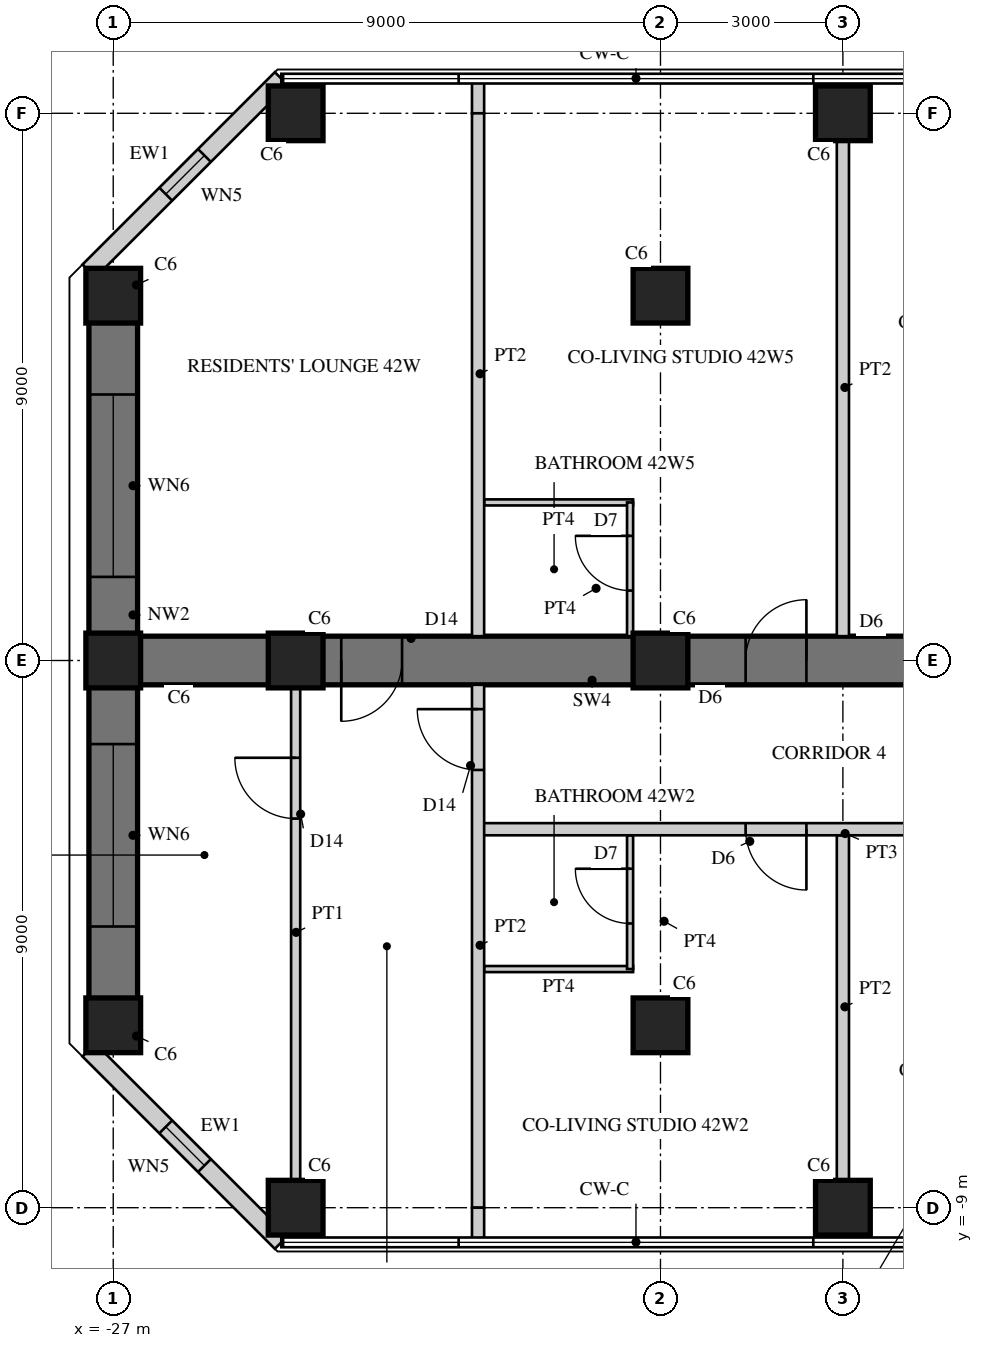
"""IFC4 building model, lengths in metres.
Left out: names, types, materials, properties, quantities, classifications, styles, units other than length and angle.
Written with IfcOpenShell. Run it as: python <this file> out.ifc"""

import sys

from ifc_helpers import new_model, si_unit, direction, frame, frame_2d, origin, origin_2d, place, context, subcontext, project, spatial, rectangle, hollow_rectangle, extrude, element, fill, save


model = new_model("IFC4")
c1 = context("Model", 3, precision=1e-05, world=origin(), true_north=direction((0.0, 1.0)))
c2 = subcontext(c1, "Body", "Model", "MODEL_VIEW")
j1 = project(units=[si_unit("LENGTHUNIT", "METRE"), si_unit("PLANEANGLEUNIT", "RADIAN")], contexts=[c1])
p1 = place(None, origin())
s1 = spatial("IfcSite", under=j1, at=p1, CompositionType="ELEMENT")
p2 = place(p1, origin())
s2 = spatial("IfcBuilding", under=s1, at=p2, CompositionType="ELEMENT")
p3 = place(p2, frame((0.0, 0.0, 172.9)))
s3 = spatial("IfcBuildingStorey", under=s2, at=p3, CompositionType="ELEMENT", Elevation=172.9)
p4 = place(p3, frame((-9.0, 0.0, 0.0), z_axis=(0.0, 0.0, 1.0), x_axis=(-1.0, 0.0, 0.0)))
e1 = element("IfcWall", 1, at=p4, inside=s3, PredefinedType="SHEAR", context=c2, shape_type="SweptSolid", body=[
    extrude(rectangle(XDim=18.0, YDim=0.8, at=frame_2d((9.0, 0.0))), origin(), (0.0, 0.0, 1.0), 3.4),
])
p5 = place(p4, frame((3.95, 0.0, 0.0)))
e2 = element("IfcOpeningElement", 2, at=p5, cuts=e1, PredefinedType="OPENING", context=c2, shape_type="SweptSolid", body=[
    extrude(rectangle(XDim=1.0, YDim=2.15, at=frame_2d((0.5, 1.075))), frame((0.0, 0.41, 0.0), z_axis=(0.0, -1.0, 0.0), x_axis=(1.0, 0.0, 0.0)), (0.0, 0.0, 1.0), 0.82),
])
p6 = place(p4, frame((6.6, 0.0, 0.0)))
e3 = element("IfcOpeningElement", 3, at=p6, cuts=e1, PredefinedType="OPENING", context=c2, shape_type="SweptSolid", body=[
    extrude(rectangle(XDim=1.0, YDim=2.15, at=frame_2d((0.5, 1.075))), frame((0.0, 0.41, 0.0), z_axis=(0.0, -1.0, 0.0), x_axis=(1.0, 0.0, 0.0)), (0.0, 0.0, 1.0), 0.82),
])
p7 = place(p4, frame((13.25, 0.0, 0.0)))
e4 = element("IfcOpeningElement", 4, at=p7, cuts=e1, PredefinedType="OPENING", context=c2, shape_type="SweptSolid", body=[
    extrude(rectangle(XDim=1.0, YDim=2.2, at=frame_2d((0.5, 1.1))), frame((0.0, 0.41, 0.0), z_axis=(0.0, -1.0, 0.0), x_axis=(1.0, 0.0, 0.0)), (0.0, 0.0, 1.0), 0.82),
])
p8 = place(p3, frame((-27.0, 6.0, 0.0), z_axis=(0.0, 0.0, 1.0), x_axis=(0.0, -1.0, 0.0)))
e5 = element("IfcWall", 5, at=p8, inside=s3, PredefinedType="SHEAR", context=c2, shape_type="SweptSolid", body=[
    extrude(rectangle(XDim=12.0, YDim=0.8, at=frame_2d((6.0, 0.0))), origin(), (0.0, 0.0, 1.0), 3.4),
])
p9 = place(p8, frame((1.625, 0.0, 0.6)))
e6 = element("IfcOpeningElement", 6, at=p9, cuts=e5, PredefinedType="OPENING", context=c2, shape_type="SweptSolid", body=[
    extrude(rectangle(XDim=3.0, YDim=2.4, at=frame_2d((1.5, 1.2))), frame((0.0, 0.41, 0.0), z_axis=(0.0, -1.0, 0.0), x_axis=(1.0, 0.0, 0.0)), (0.0, 0.0, 1.0), 0.82),
])
p10 = place(p8, frame((7.375, 0.0, 0.6)))
e7 = element("IfcOpeningElement", 7, at=p10, cuts=e5, PredefinedType="OPENING", context=c2, shape_type="SweptSolid", body=[
    extrude(rectangle(XDim=3.0, YDim=2.4, at=frame_2d((1.5, 1.2))), frame((0.0, 0.41, 0.0), z_axis=(0.0, -1.0, 0.0), x_axis=(1.0, 0.0, 0.0)), (0.0, 0.0, 1.0), 0.82),
])
for number, where, z_axis, x_axis in (
    (8, (-15.0, 9.0, 0.0), (0.0, 0.0, 1.0), (1.0, 0.0, 0.0)),
    (9, (-24.0, 9.0, 0.0), (0.0, 0.0, 1.0), (1.0, 0.0, 0.0)),
    (10, (-15.0, -9.0, 0.0), (0.0, 0.0, 1.0), (1.0, 0.0, 0.0)),
    (11, (-24.0, -9.0, 0.0), (0.0, 0.0, 1.0), (1.0, 0.0, 0.0)),
    (12, (-27.0, 6.0, 0.0), (0.0, 0.0, 1.0), (1.0, 0.0, 0.0)),
    (13, (-27.0, 0.0, 0.0), (0.0, 0.0, 1.0), (1.0, 0.0, 0.0)),
    (14, (-27.0, -6.0, 0.0), (0.0, 0.0, 1.0), (1.0, 0.0, 0.0)),
    (15, (-18.0, 6.0, 0.0), (0.0, 0.0, 1.0), (1.0, 0.0, 0.0)),
    (16, (-18.0, 0.0, 0.0), (0.0, 0.0, 1.0), (1.0, 0.0, 0.0)),
    (17, (-18.0, -6.0, 0.0), (0.0, 0.0, 1.0), (1.0, 0.0, 0.0)),
    (18, (-24.0, 0.0, 0.0), (0.0, 0.0, 1.0), (1.0, 0.0, 0.0)),
):
    element("IfcColumn", number, at=place(p3, frame(where, z_axis=z_axis, x_axis=x_axis)), inside=s3, PredefinedType="COLUMN", context=c2, shape_type="SweptSolid", body=[
        extrude(rectangle(XDim=0.9, YDim=0.9, at=origin_2d()), origin(), (0.0, 0.0, 1.0), 3.4),
    ])
p11 = place(p3, frame((-24.236, 9.57, 0.0), z_axis=(0.0, 0.0, 1.0), x_axis=(-0.707079499254, -0.707134062067, 0.0)))
e19 = element("IfcWall", 19, at=p11, inside=s3, PredefinedType="SOLIDWALL", context=c2, shape_type="SweptSolid", body=[
    extrude(rectangle(XDim=4.475, YDim=0.3, at=frame_2d((2.237, 0.0))), origin(), (0.0, 0.0, 1.0), 3.22),
])
p12 = place(p11, frame((1.787, 0.0, 0.3)))
e20 = element("IfcOpeningElement", 20, at=p12, cuts=e19, PredefinedType="OPENING", context=c2, shape_type="SweptSolid", body=[
    extrude(rectangle(XDim=0.9, YDim=2.4, at=frame_2d((0.45, 1.2))), frame((0.0, 0.16, 0.0), z_axis=(0.0, -1.0, 0.0), x_axis=(1.0, 0.0, 0.0)), (0.0, 0.0, 1.0), 0.32),
])
p13 = place(p3, frame((-27.4, -6.406, 0.0), z_axis=(0.0, 0.0, 1.0), x_axis=(0.707079499254, -0.707134062067, 0.0)))
e21 = element("IfcWall", 21, at=p13, inside=s3, PredefinedType="SOLIDWALL", context=c2, shape_type="SweptSolid", body=[
    extrude(rectangle(XDim=4.475, YDim=0.3, at=frame_2d((2.237, 0.0))), origin(), (0.0, 0.0, 1.0), 3.22),
])
p14 = place(p13, frame((1.787, 0.0, 0.3)))
e22 = element("IfcOpeningElement", 22, at=p14, cuts=e21, PredefinedType="OPENING", context=c2, shape_type="SweptSolid", body=[
    extrude(rectangle(XDim=0.9, YDim=2.4, at=frame_2d((0.45, 1.2))), frame((0.0, 0.16, 0.0), z_axis=(0.0, -1.0, 0.0), x_axis=(1.0, 0.0, 0.0)), (0.0, 0.0, 1.0), 0.32),
])
p15 = place(p3, frame((-15.0, -2.875, 0.0), z_axis=(0.0, 0.0, 1.0), x_axis=(0.0, -1.0, 0.0)))
e23 = element("IfcWall", 23, at=p15, inside=s3, PredefinedType="SOLIDWALL", context=c2, shape_type="SweptSolid", body=[
    extrude(rectangle(XDim=5.675, YDim=0.2, at=frame_2d((2.837, 0.0))), origin(), (0.0, 0.0, 1.0), 2.47),
])
p16 = place(p3, frame((-15.0, 8.55, 0.0), z_axis=(0.0, 0.0, 1.0), x_axis=(0.0, -1.0, 0.0)))
e24 = element("IfcWall", 24, at=p16, inside=s3, PredefinedType="SOLIDWALL", context=c2, shape_type="SweptSolid", body=[
    extrude(rectangle(XDim=8.15, YDim=0.2, at=frame_2d((4.075, 0.0))), origin(), (0.0, 0.0, 1.0), 2.47),
])
p17 = place(p3, frame((-18.45, -5.075, 0.0), z_axis=(0.0, 0.0, 1.0), x_axis=(-1.0, 0.0, 0.0)))
e25 = element("IfcWall", 25, at=p17, inside=s3, PredefinedType="PARTITIONING", context=c2, shape_type="SweptSolid", body=[
    extrude(rectangle(XDim=2.45, YDim=0.1, at=frame_2d((1.225, 0.0))), origin(), (0.0, 0.0, 1.0), 3.22),
])
p18 = place(p3, frame((-18.5, -2.875, 0.0), z_axis=(0.0, 0.0, 1.0), x_axis=(0.0, -1.0, 0.0)))
e26 = element("IfcWall", 26, at=p18, inside=s3, PredefinedType="PARTITIONING", context=c2, shape_type="SweptSolid", body=[
    extrude(rectangle(XDim=2.2, YDim=0.1, at=frame_2d((1.1, 0.0))), origin(), (0.0, 0.0, 1.0), 3.22),
])
p19 = place(p18, frame((0.55, 0.0, 0.0)))
e27 = element("IfcOpeningElement", 27, at=p19, cuts=e26, PredefinedType="OPENING", context=c2, shape_type="SweptSolid", body=[
    extrude(rectangle(XDim=0.9, YDim=2.1, at=frame_2d((0.45, 1.05))), frame((0.0, 0.06, 0.0), z_axis=(0.0, -1.0, 0.0), x_axis=(1.0, 0.0, 0.0)), (0.0, 0.0, 1.0), 0.12),
])
p20 = place(p3, frame((-18.45, 2.6, 0.0), z_axis=(0.0, 0.0, 1.0), x_axis=(-1.0, 0.0, 0.0)))
e28 = element("IfcWall", 28, at=p20, inside=s3, PredefinedType="PARTITIONING", context=c2, shape_type="SweptSolid", body=[
    extrude(rectangle(XDim=2.45, YDim=0.1, at=frame_2d((1.225, 0.0))), origin(), (0.0, 0.0, 1.0), 3.22),
])
p21 = place(p3, frame((-18.5, 2.6, 0.0), z_axis=(0.0, 0.0, 1.0), x_axis=(0.0, -1.0, 0.0)))
e29 = element("IfcWall", 29, at=p21, inside=s3, PredefinedType="PARTITIONING", context=c2, shape_type="SweptSolid", body=[
    extrude(rectangle(XDim=2.2, YDim=0.1, at=frame_2d((1.1, 0.0))), origin(), (0.0, 0.0, 1.0), 3.22),
])
p22 = place(p21, frame((0.55, 0.0, 0.0)))
e30 = element("IfcOpeningElement", 30, at=p22, cuts=e29, PredefinedType="OPENING", context=c2, shape_type="SweptSolid", body=[
    extrude(rectangle(XDim=0.9, YDim=2.1, at=frame_2d((0.45, 1.05))), frame((0.0, 0.06, 0.0), z_axis=(0.0, -1.0, 0.0), x_axis=(1.0, 0.0, 0.0)), (0.0, 0.0, 1.0), 0.12),
])
p23 = place(p3, frame((-9.55, -2.775, 0.0), z_axis=(0.0, 0.0, 1.0), x_axis=(-1.0, 0.0, 0.0)))
e31 = element("IfcWall", 31, at=p23, inside=s3, PredefinedType="SOLIDWALL", context=c2, shape_type="SweptSolid", body=[
    extrude(rectangle(XDim=11.45, YDim=0.2, at=frame_2d((5.725, 0.0))), origin(), (0.0, 0.0, 1.0), 3.22),
])
p24 = place(p23, frame((3.4, 0.0, 0.0)))
e32 = element("IfcOpeningElement", 32, at=p24, cuts=e31, PredefinedType="OPENING", context=c2, shape_type="SweptSolid", body=[
    extrude(rectangle(XDim=1.0, YDim=2.15, at=frame_2d((0.5, 1.075))), frame((0.0, 0.11, 0.0), z_axis=(0.0, -1.0, 0.0), x_axis=(1.0, 0.0, 0.0)), (0.0, 0.0, 1.0), 0.22),
])
p25 = place(p23, frame((6.05, 0.0, 0.0)))
e33 = element("IfcOpeningElement", 33, at=p25, cuts=e31, PredefinedType="OPENING", context=c2, shape_type="SweptSolid", body=[
    extrude(rectangle(XDim=1.0, YDim=2.15, at=frame_2d((0.5, 1.075))), frame((0.0, 0.11, 0.0), z_axis=(0.0, -1.0, 0.0), x_axis=(1.0, 0.0, 0.0)), (0.0, 0.0, 1.0), 0.22),
])
p26 = place(p3, frame((-24.0, -0.4, 0.0), z_axis=(0.0, 0.0, 1.0), x_axis=(0.0, -1.0, 0.0)))
e34 = element("IfcWall", 34, at=p26, inside=s3, PredefinedType="PARTITIONING", context=c2, shape_type="SweptSolid", body=[
    extrude(rectangle(XDim=8.15, YDim=0.15, at=frame_2d((4.075, 0.0))), origin(), (0.0, 0.0, 1.0), 2.47),
])
p27 = place(p26, frame((1.2, 0.0, 0.0)))
e35 = element("IfcOpeningElement", 35, at=p27, cuts=e34, PredefinedType="OPENING", context=c2, shape_type="SweptSolid", body=[
    extrude(rectangle(XDim=1.0, YDim=2.2, at=frame_2d((0.5, 1.1))), frame((0.0, 0.085, 0.0), z_axis=(0.0, -1.0, 0.0), x_axis=(1.0, 0.0, 0.0)), (0.0, 0.0, 1.0), 0.17),
])
p28 = place(p3, frame((-21.0, 9.53, 0.0), z_axis=(0.0, 0.0, 1.0), x_axis=(0.0, -1.0, 0.0)))
e36 = element("IfcWall", 36, at=p28, inside=s3, PredefinedType="SOLIDWALL", context=c2, shape_type="SweptSolid", body=[
    extrude(rectangle(XDim=0.53, YDim=0.2, at=frame_2d((0.265, 0.0))), origin(), (0.0, 0.0, 1.0), 3.22),
])
p29 = place(p3, frame((-21.0, 9.0, 0.0), z_axis=(0.0, 0.0, 1.0), x_axis=(0.0, -1.0, 0.0)))
e37 = element("IfcWall", 37, at=p29, inside=s3, PredefinedType="SOLIDWALL", context=c2, shape_type="SweptSolid", body=[
    extrude(rectangle(XDim=8.6, YDim=0.2, at=frame_2d((4.3, 0.0))), origin(), (0.0, 0.0, 1.0), 2.62),
])
p30 = place(p3, frame((-21.0, -0.4, 0.0), z_axis=(0.0, 0.0, 1.0), x_axis=(0.0, -1.0, 0.0)))
e38 = element("IfcWall", 38, at=p30, inside=s3, PredefinedType="SOLIDWALL", context=c2, shape_type="SweptSolid", body=[
    extrude(rectangle(XDim=8.6, YDim=0.2, at=frame_2d((4.3, 0.0))), origin(), (0.0, 0.0, 1.0), 2.62),
])
p31 = place(p30, frame((0.4, 0.0, 0.0)))
e39 = element("IfcOpeningElement", 39, at=p31, cuts=e38, PredefinedType="OPENING", context=c2, shape_type="SweptSolid", body=[
    extrude(rectangle(XDim=1.0, YDim=2.2, at=frame_2d((0.5, 1.1))), frame((0.0, 0.11, 0.0), z_axis=(0.0, -1.0, 0.0), x_axis=(1.0, 0.0, 0.0)), (0.0, 0.0, 1.0), 0.22),
])
p32 = place(p3, frame((-21.0, -9.0, 0.0), z_axis=(0.0, 0.0, 1.0), x_axis=(0.0, -1.0, 0.0)))
e40 = element("IfcWall", 40, at=p32, inside=s3, PredefinedType="SOLIDWALL", context=c2, shape_type="SweptSolid", body=[
    extrude(rectangle(XDim=0.53, YDim=0.2, at=frame_2d((0.265, 0.0))), origin(), (0.0, 0.0, 1.0), 3.22),
])
p33 = place(p12, origin())
e41 = element("IfcWindow", 41, at=p33, inside=s3, PartitioningType="SINGLE_PANEL", PredefinedType="WINDOW", context=c2, shape_type="SweptSolid", body=[
    extrude(hollow_rectangle(XDim=0.9, YDim=2.4, WallThickness=0.06, at=frame_2d((0.45, 1.2))), frame((0.0, 0.03, 0.0), z_axis=(0.0, -1.0, 0.0), x_axis=(1.0, 0.0, 0.0)), (0.0, 0.0, 1.0), 0.06),
    extrude(rectangle(XDim=0.779, YDim=2.279, at=frame_2d((0.45, 1.2))), frame((0.0, 0.03, 0.0), z_axis=(0.0, -1.0, 0.0), x_axis=(1.0, 0.0, 0.0)), (0.0, 0.0, 1.0), 0.06),
])
fill(e20, e41)
p34 = place(p9, origin())
e42 = element("IfcWindow", 42, at=p34, inside=s3, PartitioningType="SINGLE_PANEL", PredefinedType="WINDOW", context=c2, shape_type="SweptSolid", body=[
    extrude(hollow_rectangle(XDim=3.0, YDim=2.4, WallThickness=0.06, at=frame_2d((1.5, 1.2))), frame((0.0, 0.03, 0.0), z_axis=(0.0, -1.0, 0.0), x_axis=(1.0, 0.0, 0.0)), (0.0, 0.0, 1.0), 0.06),
    extrude(rectangle(XDim=2.879, YDim=2.279, at=frame_2d((1.5, 1.2))), frame((0.0, 0.03, 0.0), z_axis=(0.0, -1.0, 0.0), x_axis=(1.0, 0.0, 0.0)), (0.0, 0.0, 1.0), 0.06),
])
fill(e6, e42)
p35 = place(p10, origin())
e43 = element("IfcWindow", 43, at=p35, inside=s3, PartitioningType="SINGLE_PANEL", PredefinedType="WINDOW", context=c2, shape_type="SweptSolid", body=[
    extrude(hollow_rectangle(XDim=3.0, YDim=2.4, WallThickness=0.06, at=frame_2d((1.5, 1.2))), frame((0.0, 0.03, 0.0), z_axis=(0.0, -1.0, 0.0), x_axis=(1.0, 0.0, 0.0)), (0.0, 0.0, 1.0), 0.06),
    extrude(rectangle(XDim=2.879, YDim=2.279, at=frame_2d((1.5, 1.2))), frame((0.0, 0.03, 0.0), z_axis=(0.0, -1.0, 0.0), x_axis=(1.0, 0.0, 0.0)), (0.0, 0.0, 1.0), 0.06),
])
fill(e7, e43)
p36 = place(p14, origin())
e44 = element("IfcWindow", 44, at=p36, inside=s3, PartitioningType="SINGLE_PANEL", PredefinedType="WINDOW", context=c2, shape_type="SweptSolid", body=[
    extrude(hollow_rectangle(XDim=0.9, YDim=2.4, WallThickness=0.06, at=frame_2d((0.45, 1.2))), frame((0.0, 0.03, 0.0), z_axis=(0.0, -1.0, 0.0), x_axis=(1.0, 0.0, 0.0)), (0.0, 0.0, 1.0), 0.06),
    extrude(rectangle(XDim=0.779, YDim=2.279, at=frame_2d((0.45, 1.2))), frame((0.0, 0.03, 0.0), z_axis=(0.0, -1.0, 0.0), x_axis=(1.0, 0.0, 0.0)), (0.0, 0.0, 1.0), 0.06),
])
fill(e22, e44)
p37 = place(p19, frame((0.9, 0.0, 0.0), z_axis=(0.0, 0.0, 1.0), x_axis=(-1.0, 0.0, 0.0)))
e45 = element("IfcDoor", 45, at=p37, inside=s3, OperationType="SINGLE_SWING_RIGHT", PredefinedType="DOOR", context=c2, shape_type="SweptSolid", body=[
    extrude(rectangle(XDim=0.9, YDim=2.1, at=frame_2d((0.45, 1.05))), frame((0.0, 0.025, 0.0), z_axis=(0.0, -1.0, 0.0), x_axis=(1.0, 0.0, 0.0)), (0.0, 0.0, 1.0), 0.05),
])
fill(e27, e45)
p38 = place(p22, frame((0.9, 0.0, 0.0), z_axis=(0.0, 0.0, 1.0), x_axis=(-1.0, 0.0, 0.0)))
e46 = element("IfcDoor", 46, at=p38, inside=s3, OperationType="SINGLE_SWING_RIGHT", PredefinedType="DOOR", context=c2, shape_type="SweptSolid", body=[
    extrude(rectangle(XDim=0.9, YDim=2.1, at=frame_2d((0.45, 1.05))), frame((0.0, 0.025, 0.0), z_axis=(0.0, -1.0, 0.0), x_axis=(1.0, 0.0, 0.0)), (0.0, 0.0, 1.0), 0.05),
])
fill(e30, e46)
p39 = place(p25, origin())
e47 = element("IfcDoor", 47, at=p39, inside=s3, OperationType="SINGLE_SWING_LEFT", PredefinedType="DOOR", context=c2, shape_type="SweptSolid", body=[
    extrude(rectangle(XDim=1.0, YDim=2.15, at=frame_2d((0.5, 1.075))), frame((0.0, 0.025, 0.0), z_axis=(0.0, -1.0, 0.0), x_axis=(1.0, 0.0, 0.0)), (0.0, 0.0, 1.0), 0.05),
])
fill(e33, e47)
p40 = place(p27, frame((1.0, 0.0, 0.0), z_axis=(0.0, 0.0, 1.0), x_axis=(-1.0, 0.0, 0.0)))
e48 = element("IfcDoor", 48, at=p40, inside=s3, OperationType="SINGLE_SWING_RIGHT", PredefinedType="DOOR", context=c2, shape_type="SweptSolid", body=[
    extrude(rectangle(XDim=1.0, YDim=2.2, at=frame_2d((0.5, 1.1))), frame((0.0, 0.025, 0.0), z_axis=(0.0, -1.0, 0.0), x_axis=(1.0, 0.0, 0.0)), (0.0, 0.0, 1.0), 0.05),
])
fill(e35, e48)
p41 = place(p31, frame((1.0, 0.0, 0.0), z_axis=(0.0, 0.0, 1.0), x_axis=(-1.0, 0.0, 0.0)))
e49 = element("IfcDoor", 49, at=p41, inside=s3, OperationType="SINGLE_SWING_RIGHT", PredefinedType="DOOR", context=c2, shape_type="SweptSolid", body=[
    extrude(rectangle(XDim=1.0, YDim=2.2, at=frame_2d((0.5, 1.1))), frame((0.0, 0.025, 0.0), z_axis=(0.0, -1.0, 0.0), x_axis=(1.0, 0.0, 0.0)), (0.0, 0.0, 1.0), 0.05),
])
fill(e39, e49)
p42 = place(p6, frame((1.0, 0.0, 0.0), z_axis=(0.0, 0.0, 1.0), x_axis=(-1.0, 0.0, 0.0)))
e50 = element("IfcDoor", 50, at=p42, inside=s3, OperationType="SINGLE_SWING_RIGHT", PredefinedType="DOOR", context=c2, shape_type="SweptSolid", body=[
    extrude(rectangle(XDim=1.0, YDim=2.15, at=frame_2d((0.5, 1.075))), frame((0.0, 0.025, 0.0), z_axis=(0.0, -1.0, 0.0), x_axis=(1.0, 0.0, 0.0)), (0.0, 0.0, 1.0), 0.05),
])
fill(e3, e50)
p43 = place(p7, origin())
e51 = element("IfcDoor", 51, at=p43, inside=s3, OperationType="SINGLE_SWING_RIGHT", PredefinedType="DOOR", context=c2, shape_type="SweptSolid", body=[
    extrude(rectangle(XDim=1.0, YDim=2.2, at=frame_2d((0.5, 1.1))), frame((0.0, 0.025, 0.0), z_axis=(0.0, -1.0, 0.0), x_axis=(1.0, 0.0, 0.0)), (0.0, 0.0, 1.0), 0.05),
])
fill(e4, e51)
save(model, sys.argv[1])
